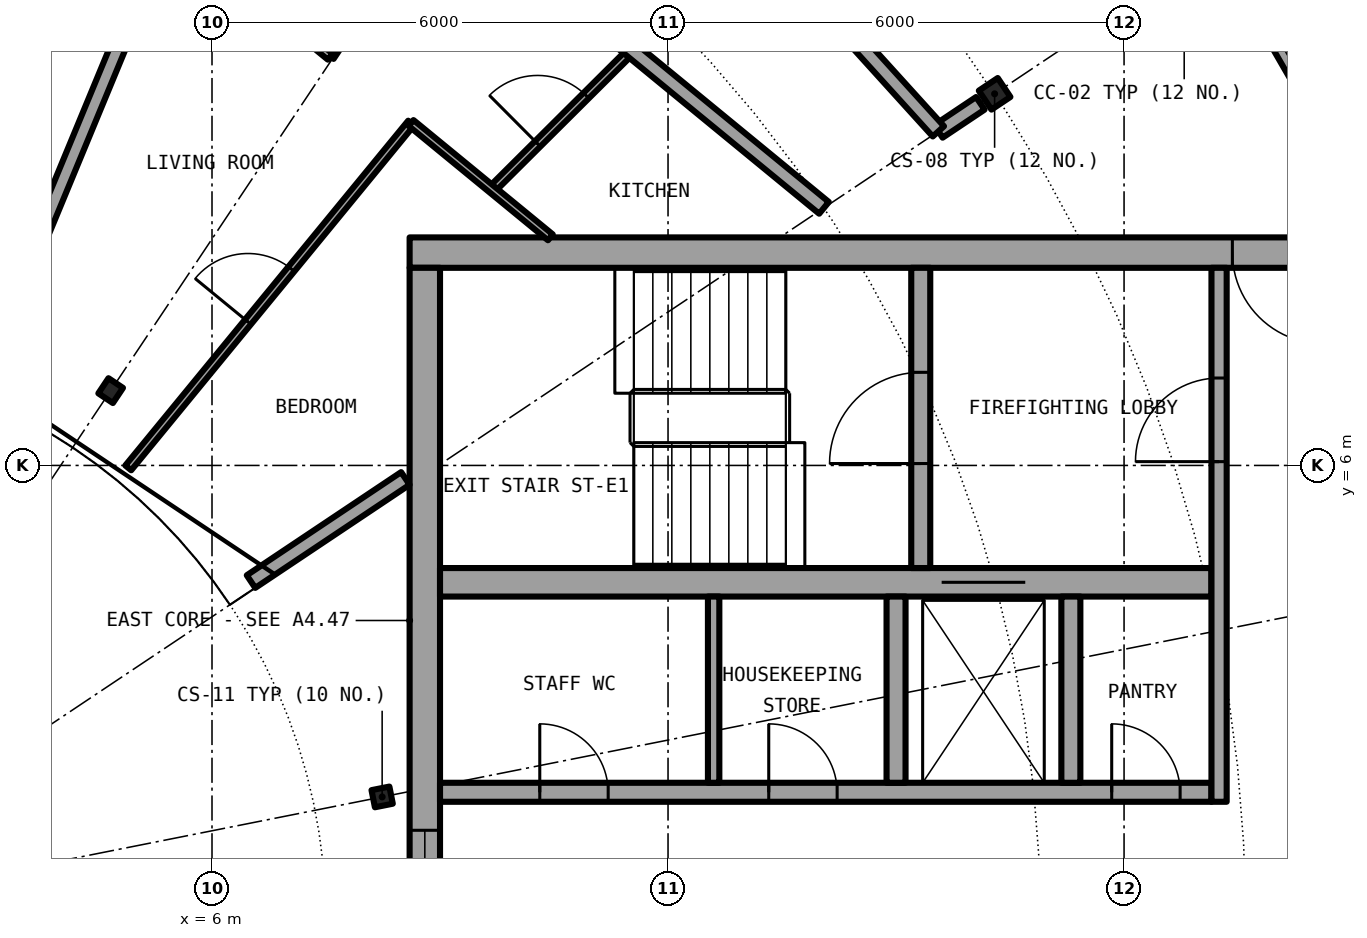
"""IFC4 building model, lengths in metres.
Left out: names, types, materials, properties, quantities, classifications, styles, units other than length and angle.
Written with IfcOpenShell. Run it as: python <this file> out.ifc"""

import sys

from ifc_helpers import new_model, si_unit, direction, frame, frame_2d, origin, origin_2d, place, context, subcontext, project, spatial, rectangle, i_section, extrude, element, fill, save


model = new_model("IFC4")
c1 = context("Model", 3, precision=1e-05, world=origin(), true_north=direction((0.0, 1.0)))
c2 = subcontext(c1, "Body", "Model", "MODEL_VIEW")
j1 = project(units=[si_unit("LENGTHUNIT", "METRE"), si_unit("PLANEANGLEUNIT", "RADIAN")], contexts=[c1])
p1 = place(None, origin())
s1 = spatial("IfcSite", under=j1, at=p1, CompositionType="ELEMENT")
p2 = place(p1, origin())
s2 = spatial("IfcBuilding", under=s1, at=p2, CompositionType="ELEMENT")
p3 = place(p2, frame((0.0, 0.0, 249.3)))
s3 = spatial("IfcBuildingStorey", under=s2, at=p3, CompositionType="ELEMENT", Elevation=249.3)
p4 = place(p3, frame((16.297, 10.889, 0.0), z_axis=(0.0, 0.0, 1.0), x_axis=(0.831469612303, 0.55557023302, 0.0)))
e1 = element("IfcColumn", 1, at=p4, inside=s3, PredefinedType="COLUMN", context=c2, shape_type="SweptSolid", body=[
    extrude(i_section(OverallWidth=0.3, OverallDepth=0.3, WebThickness=0.011, FlangeThickness=0.019, FilletRadius=0.027, at=origin_2d()), origin(), (0.0, 0.0, 1.0), 3.05),
])
for number, where, z_axis, x_axis in (
    (2, (8.239, 1.639, 0.0), (0.0, 0.0, 1.0), (0.981, 0.195, 0.0)),
    (3, (4.667, 6.984, 0.0), (0.0, 0.0, 1.0), (0.556, 0.831, 0.0)),
):
    element("IfcColumn", number, at=place(p3, frame(where, z_axis=z_axis, x_axis=x_axis)), inside=s3, PredefinedType="COLUMN", context=c2, shape_type="SweptSolid", body=[
        extrude(i_section(OverallWidth=0.24, OverallDepth=0.23, WebThickness=0.008, FlangeThickness=0.012, FilletRadius=0.021, at=origin_2d()), origin(), (0.0, 0.0, 1.0), 3.05),
    ])
p5 = place(p3, frame((20.807, 10.261, 0.0), z_axis=(0.0, 0.0, 1.0), x_axis=(-0.499903546559, 0.866081084043, 0.0)))
e4 = element("IfcWall", 4, at=p5, inside=s3, PredefinedType="SOLIDWALL", context=c2, shape_type="SweptSolid", body=[
    extrude(rectangle(XDim=3.034, YDim=0.25, at=frame_2d((1.517, 0.0))), origin(), (0.0, 0.0, 1.0), 2.7),
])
p6 = place(p5, frame((0.617, 0.0, 0.3)))
e5 = element("IfcOpeningElement", 5, at=p6, cuts=e4, PredefinedType="OPENING", context=c2, shape_type="SweptSolid", body=[
    extrude(rectangle(XDim=1.8, YDim=2.1, at=frame_2d((0.9, 1.05))), frame((0.0, 0.135, 0.0), z_axis=(0.0, -1.0, 0.0), x_axis=(1.0, 0.0, 0.0)), (0.0, 0.0, 1.0), 0.27),
])
p7 = place(p3, frame((21.1, 8.8, 0.0), z_axis=(0.0, 0.0, 1.0), x_axis=(-1.0, 0.0, 0.0)))
e6 = element("IfcWall", 6, at=p7, inside=s3, PredefinedType="SHEAR", context=c2, shape_type="SweptSolid", body=[
    extrude(rectangle(XDim=12.5, YDim=0.4, at=frame_2d((6.25, 0.0))), origin(), (0.0, 0.0, 1.0), 3.05),
])
p8 = place(p7, frame((0.475, 0.0, 0.0)))
e7 = element("IfcOpeningElement", 7, at=p8, cuts=e6, PredefinedType="OPENING", context=c2, shape_type="SweptSolid", body=[
    extrude(rectangle(XDim=1.2, YDim=2.3, at=frame_2d((0.6, 1.15))), frame((0.0, 0.21, 0.0), z_axis=(0.0, -1.0, 0.0), x_axis=(1.0, 0.0, 0.0)), (0.0, 0.0, 1.0), 0.42),
])
p9 = place(p3, frame((8.8, -8.6, 0.0), z_axis=(0.0, 0.0, 1.0), x_axis=(0.0, 1.0, 0.0)))
e8 = element("IfcWall", 8, at=p9, inside=s3, PredefinedType="SHEAR", context=c2, shape_type="SweptSolid", body=[
    extrude(rectangle(XDim=17.2, YDim=0.4, at=frame_2d((8.6, 0.0))), origin(), (0.0, 0.0, 1.0), 3.05),
])
p10 = place(p9, frame((7.4, 0.0, 0.1)))
e9 = element("IfcOpeningElement", 9, at=p10, cuts=e8, PredefinedType="OPENING", context=c2, shape_type="SweptSolid", body=[
    extrude(rectangle(XDim=2.4, YDim=2.2, at=frame_2d((1.2, 1.1))), frame((0.0, 0.21, 0.0), z_axis=(0.0, -1.0, 0.0), x_axis=(1.0, 0.0, 0.0)), (0.0, 0.0, 1.0), 0.42),
])
p11 = place(p3, frame((9.0, 1.7, 0.0), z_axis=(0.0, 0.0, 1.0), x_axis=(1.0, 0.0, 0.0)))
e10 = element("IfcWall", 10, at=p11, inside=s3, PredefinedType="SHEAR", context=c2, shape_type="SweptSolid", body=[
    extrude(rectangle(XDim=10.15, YDim=0.25, at=frame_2d((5.075, 0.0))), origin(), (0.0, 0.0, 1.0), 3.05),
])
p12 = place(p11, frame((1.312, 0.0, 0.0)))
e11 = element("IfcOpeningElement", 11, at=p12, cuts=e10, PredefinedType="OPENING", context=c2, shape_type="SweptSolid", body=[
    extrude(rectangle(XDim=0.9, YDim=2.3, at=frame_2d((0.45, 1.15))), frame((0.0, 0.135, 0.0), z_axis=(0.0, -1.0, 0.0), x_axis=(1.0, 0.0, 0.0)), (0.0, 0.0, 1.0), 0.27),
])
p13 = place(p11, frame((4.325, 0.0, 0.0)))
e12 = element("IfcOpeningElement", 12, at=p13, cuts=e10, PredefinedType="OPENING", context=c2, shape_type="SweptSolid", body=[
    extrude(rectangle(XDim=0.9, YDim=2.3, at=frame_2d((0.45, 1.15))), frame((0.0, 0.135, 0.0), z_axis=(0.0, -1.0, 0.0), x_axis=(1.0, 0.0, 0.0)), (0.0, 0.0, 1.0), 0.27),
])
p14 = place(p11, frame((8.837, 0.0, 0.0)))
e13 = element("IfcOpeningElement", 13, at=p14, cuts=e10, PredefinedType="OPENING", context=c2, shape_type="SweptSolid", body=[
    extrude(rectangle(XDim=0.9, YDim=2.3, at=frame_2d((0.45, 1.15))), frame((0.0, 0.135, 0.0), z_axis=(0.0, -1.0, 0.0), x_axis=(1.0, 0.0, 0.0)), (0.0, 0.0, 1.0), 0.27),
])
p15 = place(p3, frame((9.0, 4.462, 0.0), z_axis=(0.0, 0.0, 1.0), x_axis=(1.0, 0.0, 0.0)))
e14 = element("IfcWall", 14, at=p15, inside=s3, PredefinedType="SHEAR", context=c2, shape_type="SweptSolid", body=[
    extrude(rectangle(XDim=10.15, YDim=0.375, at=frame_2d((5.075, 0.0))), origin(), (0.0, 0.0, 1.0), 3.05),
])
p16 = place(p15, frame((6.6, 0.0, 0.0)))
e15 = element("IfcOpeningElement", 15, at=p16, cuts=e14, PredefinedType="OPENING", context=c2, shape_type="SweptSolid", body=[
    extrude(rectangle(XDim=1.1, YDim=2.3, at=frame_2d((0.55, 1.15))), frame((0.0, 0.198, 0.0), z_axis=(0.0, -1.0, 0.0), x_axis=(1.0, 0.0, 0.0)), (0.0, 0.0, 1.0), 0.395),
])
p17 = place(p3, frame((15.325, 4.65, 0.0), z_axis=(0.0, 0.0, 1.0), x_axis=(0.0, 1.0, 0.0)))
e16 = element("IfcWall", 16, at=p17, inside=s3, PredefinedType="SHEAR", context=c2, shape_type="SweptSolid", body=[
    extrude(rectangle(XDim=3.95, YDim=0.25, at=frame_2d((1.975, 0.0))), origin(), (0.0, 0.0, 1.0), 3.05),
])
p18 = place(p17, frame((1.375, 0.0, 0.0)))
e17 = element("IfcOpeningElement", 17, at=p18, cuts=e16, PredefinedType="OPENING", context=c2, shape_type="SweptSolid", body=[
    extrude(rectangle(XDim=1.2, YDim=2.3, at=frame_2d((0.6, 1.15))), frame((0.0, 0.135, 0.0), z_axis=(0.0, -1.0, 0.0), x_axis=(1.0, 0.0, 0.0)), (0.0, 0.0, 1.0), 0.27),
])
for number, where, z_axis, x_axis in (
    (18, (15.0, 1.825, 0.0), (0.0, 0.0, 1.0), (0.0, 1.0, 0.0)),
    (19, (17.3, 1.825, 0.0), (0.0, 0.0, 1.0), (0.0, 1.0, 0.0)),
):
    element("IfcWall", number, at=place(p3, frame(where, z_axis=z_axis, x_axis=x_axis)), inside=s3, PredefinedType="SOLIDWALL", context=c2, shape_type="SweptSolid", body=[
        extrude(rectangle(XDim=2.45, YDim=0.25, at=frame_2d((1.225, 0.0))), origin(), (0.0, 0.0, 1.0), 2.7),
    ])
p19 = place(p3, frame((19.25, 1.575, 0.0), z_axis=(0.0, 0.0, 1.0), x_axis=(0.0, 1.0, 0.0)))
e20 = element("IfcWall", 20, at=p19, inside=s3, PredefinedType="SOLIDWALL", context=c2, shape_type="SweptSolid", body=[
    extrude(rectangle(XDim=7.025, YDim=0.2, at=frame_2d((3.513, 0.0))), origin(), (0.0, 0.0, 1.0), 2.7),
])
p20 = place(p19, frame((4.475, 0.0, 0.0)))
e21 = element("IfcOpeningElement", 21, at=p20, cuts=e20, PredefinedType="OPENING", context=c2, shape_type="SweptSolid", body=[
    extrude(rectangle(XDim=1.1, YDim=2.3, at=frame_2d((0.55, 1.15))), frame((0.0, 0.11, 0.0), z_axis=(0.0, -1.0, 0.0), x_axis=(1.0, 0.0, 0.0)), (0.0, 0.0, 1.0), 0.22),
])
p21 = place(p3, frame((12.6, 1.825, 0.0), z_axis=(0.0, 0.0, 1.0), x_axis=(0.0, 1.0, 0.0)))
e22 = element("IfcWall", 22, at=p21, inside=s3, PredefinedType="PARTITIONING", context=c2, shape_type="SweptSolid", body=[
    extrude(rectangle(XDim=2.45, YDim=0.15, at=frame_2d((1.225, 0.0))), origin(), (0.0, 0.0, 1.0), 2.7),
])
p22 = place(p3, frame((2.955, 7.132, 0.0), z_axis=(0.0, 0.0, 1.0), x_axis=(0.382556139466, 0.923932248683, 0.0)))
e23 = element("IfcWall", 23, at=p22, inside=s3, PredefinedType="PARTITIONING", context=c2, shape_type="SweptSolid", body=[
    extrude(rectangle(XDim=9.18, YDim=0.2, at=frame_2d((4.59, 0.0))), origin(), (0.0, 0.0, 1.0), 2.7),
])
p23 = place(p3, frame((4.898, 5.968, 0.0), z_axis=(0.0, 0.0, 1.0), x_axis=(0.634358693064, 0.773038840249, 0.0)))
e24 = element("IfcWall", 24, at=p23, inside=s3, PredefinedType="PARTITIONING", context=c2, shape_type="SweptSolid", body=[
    extrude(rectangle(XDim=5.868, YDim=0.1, at=frame_2d((2.934, 0.0))), origin(), (0.0, 0.0, 1.0), 2.7),
])
p24 = place(p23, frame((2.484, 0.0, 0.0)))
e25 = element("IfcOpeningElement", 25, at=p24, cuts=e24, PredefinedType="OPENING", context=c2, shape_type="SweptSolid", body=[
    extrude(rectangle(XDim=0.9, YDim=2.3, at=frame_2d((0.45, 1.15))), frame((0.0, 0.06, 0.0), z_axis=(0.0, -1.0, 0.0), x_axis=(1.0, 0.0, 0.0)), (0.0, 0.0, 1.0), 0.12),
])
p25 = place(p3, frame((7.558, 11.376, 0.0), z_axis=(0.0, 0.0, 1.0), x_axis=(0.553615197403, 0.83277260594, 0.0)))
e26 = element("IfcWall", 26, at=p25, inside=s3, PredefinedType="PARTITIONING", context=c2, shape_type="SweptSolid", body=[
    extrude(rectangle(XDim=2.597, YDim=0.1, at=frame_2d((1.299, 0.0))), origin(), (0.0, 0.0, 1.0), 2.7),
])
p26 = place(p3, frame((9.683, 9.632, 0.0), z_axis=(0.0, 0.0, 1.0), x_axis=(0.708796844581, 0.705412668665, 0.0)))
e27 = element("IfcWall", 27, at=p26, inside=s3, PredefinedType="PARTITIONING", context=c2, shape_type="SweptSolid", body=[
    extrude(rectangle(XDim=2.597, YDim=0.1, at=frame_2d((1.299, 0.0))), origin(), (0.0, 0.0, 1.0), 2.7),
])
p27 = place(p26, frame((0.849, 0.0, 0.0)))
e28 = element("IfcOpeningElement", 28, at=p27, cuts=e27, PredefinedType="OPENING", context=c2, shape_type="SweptSolid", body=[
    extrude(rectangle(XDim=0.9, YDim=2.3, at=frame_2d((0.45, 1.15))), frame((0.0, 0.06, 0.0), z_axis=(0.0, -1.0, 0.0), x_axis=(1.0, 0.0, 0.0)), (0.0, 0.0, 1.0), 0.12),
])
p28 = place(p3, frame((15.557, 10.395, 0.0), z_axis=(0.0, 0.0, 1.0), x_axis=(0.831427465951, 0.555633304313, 0.0)))
e29 = element("IfcWall", 29, at=p28, inside=s3, PredefinedType="PARTITIONING", context=c2, shape_type="SweptSolid", body=[
    extrude(rectangle(XDim=0.664, YDim=0.2, at=frame_2d((0.332, 0.0))), origin(), (0.0, 0.0, 1.0), 2.7),
])
p29 = place(p3, frame((6.513, 4.472, 0.0), z_axis=(0.0, 0.0, 1.0), x_axis=(0.831450132577, 0.555599385382, 0.0)))
e30 = element("IfcWall", 30, at=p29, inside=s3, PredefinedType="PARTITIONING", context=c2, shape_type="SweptSolid", body=[
    extrude(rectangle(XDim=2.443, YDim=0.2, at=frame_2d((1.221, 0.0))), origin(), (0.0, 0.0, 1.0), 2.7),
])
p30 = place(p3, frame((5.431, 13.12, 0.0), z_axis=(0.0, 0.0, 1.0), x_axis=(0.773149312811, -0.634224045665, 0.0)))
e31 = element("IfcWall", 31, at=p30, inside=s3, PredefinedType="PARTITIONING", context=c2, shape_type="SweptSolid", body=[
    extrude(rectangle(XDim=2.749, YDim=0.1, at=frame_2d((1.374, 0.0))), origin(), (0.0, 0.0, 1.0), 2.7),
])
p31 = place(p30, frame((0.927, 0.0, 0.0)))
e32 = element("IfcOpeningElement", 32, at=p31, cuts=e31, PredefinedType="OPENING", context=c2, shape_type="SweptSolid", body=[
    extrude(rectangle(XDim=0.9, YDim=2.3, at=frame_2d((0.45, 1.15))), frame((0.0, 0.06, 0.0), z_axis=(0.0, -1.0, 0.0), x_axis=(1.0, 0.0, 0.0)), (0.0, 0.0, 1.0), 0.12),
])
p32 = place(p3, frame((8.619, 10.505, 0.0), z_axis=(0.0, 0.0, 1.0), x_axis=(0.773094085324, -0.634291364624, 0.0)))
e33 = element("IfcWall", 33, at=p32, inside=s3, PredefinedType="PARTITIONING", context=c2, shape_type="SweptSolid", body=[
    extrude(rectangle(XDim=2.371, YDim=0.1, at=frame_2d((1.186, 0.0))), origin(), (0.0, 0.0, 1.0), 2.7),
])
p33 = place(p3, frame((6.47, 15.613, 0.0), z_axis=(0.0, 0.0, 1.0), x_axis=(0.77292501819, -0.634497372931, 0.0)))
e34 = element("IfcWall", 34, at=p33, inside=s3, PredefinedType="PARTITIONING", context=c2, shape_type="SweptSolid", body=[
    extrude(rectangle(XDim=9.81, YDim=0.2, at=frame_2d((4.905, 0.0))), origin(), (0.0, 0.0, 1.0), 2.7),
])
p34 = place(p33, frame((4.404, 0.0, 0.0)))
e35 = element("IfcOpeningElement", 35, at=p34, cuts=e34, PredefinedType="OPENING", context=c2, shape_type="SweptSolid", body=[
    extrude(rectangle(XDim=1.0, YDim=2.3, at=frame_2d((0.5, 1.15))), frame((0.0, 0.11, 0.0), z_axis=(0.0, -1.0, 0.0), x_axis=(1.0, 0.0, 0.0)), (0.0, 0.0, 1.0), 0.22),
])
p35 = place(p3, frame((11.87, 14.464, 0.0), z_axis=(0.0, 0.0, 1.0), x_axis=(0.671434738137, -0.741063689856, 0.0)))
e36 = element("IfcWall", 36, at=p35, inside=s3, PredefinedType="PARTITIONING", context=c2, shape_type="SweptSolid", body=[
    extrude(rectangle(XDim=5.491, YDim=0.2, at=frame_2d((2.746, 0.0))), origin(), (0.0, 0.0, 1.0), 2.7),
])
p36 = place(p35, frame((2.245, 0.0, 0.0)))
e37 = element("IfcOpeningElement", 37, at=p36, cuts=e36, PredefinedType="OPENING", context=c2, shape_type="SweptSolid", body=[
    extrude(rectangle(XDim=1.0, YDim=2.3, at=frame_2d((0.5, 1.15))), frame((0.0, 0.11, 0.0), z_axis=(0.0, -1.0, 0.0), x_axis=(1.0, 0.0, 0.0)), (0.0, 0.0, 1.0), 0.22),
])
p37 = place(p6, origin())
e38 = element("IfcWindow", 38, at=p37, inside=s3, PartitioningType="SINGLE_PANEL", PredefinedType="WINDOW", context=c2, shape_type="SweptSolid", body=[
    extrude(rectangle(XDim=1.8, YDim=2.1, at=frame_2d((0.9, 1.05))), frame((0.0, 0.03, 0.0), z_axis=(0.0, -1.0, 0.0), x_axis=(1.0, 0.0, 0.0)), (0.0, 0.0, 1.0), 0.06),
])
fill(e5, e38)
p38 = place(p16, origin())
e39 = element("IfcDoor", 39, at=p38, inside=s3, OperationType="DOUBLE_DOOR_SLIDING", PredefinedType="DOOR", context=c2, shape_type="SweptSolid", body=[
    extrude(rectangle(XDim=1.1, YDim=2.3, at=frame_2d((0.55, 1.15))), frame((0.0, 0.025, 0.0), z_axis=(0.0, -1.0, 0.0), x_axis=(1.0, 0.0, 0.0)), (0.0, 0.0, 1.0), 0.05),
])
fill(e15, e39)
p39 = place(p12, origin())
e40 = element("IfcDoor", 40, at=p39, inside=s3, OperationType="SINGLE_SWING_RIGHT", PredefinedType="DOOR", context=c2, shape_type="SweptSolid", body=[
    extrude(rectangle(XDim=0.9, YDim=2.3, at=frame_2d((0.45, 1.15))), frame((0.0, 0.025, 0.0), z_axis=(0.0, -1.0, 0.0), x_axis=(1.0, 0.0, 0.0)), (0.0, 0.0, 1.0), 0.05),
])
fill(e11, e40)
p40 = place(p13, origin())
e41 = element("IfcDoor", 41, at=p40, inside=s3, OperationType="SINGLE_SWING_RIGHT", PredefinedType="DOOR", context=c2, shape_type="SweptSolid", body=[
    extrude(rectangle(XDim=0.9, YDim=2.3, at=frame_2d((0.45, 1.15))), frame((0.0, 0.025, 0.0), z_axis=(0.0, -1.0, 0.0), x_axis=(1.0, 0.0, 0.0)), (0.0, 0.0, 1.0), 0.05),
])
fill(e12, e41)
p41 = place(p14, origin())
e42 = element("IfcDoor", 42, at=p41, inside=s3, OperationType="SINGLE_SWING_LEFT", PredefinedType="DOOR", context=c2, shape_type="SweptSolid", body=[
    extrude(rectangle(XDim=0.9, YDim=2.3, at=frame_2d((0.45, 1.15))), frame((0.0, 0.025, 0.0), z_axis=(0.0, -1.0, 0.0), x_axis=(1.0, 0.0, 0.0)), (0.0, 0.0, 1.0), 0.05),
])
fill(e13, e42)
p42 = place(p18, origin())
e43 = element("IfcDoor", 43, at=p42, inside=s3, OperationType="SINGLE_SWING_LEFT", PredefinedType="DOOR", context=c2, shape_type="SweptSolid", body=[
    extrude(rectangle(XDim=1.2, YDim=2.3, at=frame_2d((0.6, 1.15))), frame((0.0, 0.025, 0.0), z_axis=(0.0, -1.0, 0.0), x_axis=(1.0, 0.0, 0.0)), (0.0, 0.0, 1.0), 0.05),
])
fill(e17, e43)
p43 = place(p20, origin())
e44 = element("IfcDoor", 44, at=p43, inside=s3, OperationType="SINGLE_SWING_LEFT", PredefinedType="DOOR", context=c2, shape_type="SweptSolid", body=[
    extrude(rectangle(XDim=1.1, YDim=2.3, at=frame_2d((0.55, 1.15))), frame((0.0, 0.025, 0.0), z_axis=(0.0, -1.0, 0.0), x_axis=(1.0, 0.0, 0.0)), (0.0, 0.0, 1.0), 0.05),
])
fill(e21, e44)
p44 = place(p8, origin())
e45 = element("IfcDoor", 45, at=p44, inside=s3, OperationType="SINGLE_SWING_RIGHT", PredefinedType="DOOR", context=c2, shape_type="SweptSolid", body=[
    extrude(rectangle(XDim=1.2, YDim=2.3, at=frame_2d((0.6, 1.15))), frame((0.0, 0.025, 0.0), z_axis=(0.0, -1.0, 0.0), x_axis=(1.0, 0.0, 0.0)), (0.0, 0.0, 1.0), 0.05),
])
fill(e7, e45)
p45 = place(p10, origin())
e46 = element("IfcWindow", 46, at=p45, inside=s3, PartitioningType="SINGLE_PANEL", PredefinedType="WINDOW", context=c2, shape_type="SweptSolid", body=[
    extrude(rectangle(XDim=2.4, YDim=2.2, at=frame_2d((1.2, 1.1))), frame((0.0, 0.03, 0.0), z_axis=(0.0, -1.0, 0.0), x_axis=(1.0, 0.0, 0.0)), (0.0, 0.0, 1.0), 0.06),
])
fill(e9, e46)
p46 = place(p27, origin())
e47 = element("IfcDoor", 47, at=p46, inside=s3, OperationType="SINGLE_SWING_LEFT", PredefinedType="DOOR", context=c2, shape_type="SweptSolid", body=[
    extrude(rectangle(XDim=0.9, YDim=2.3, at=frame_2d((0.45, 1.15))), frame((0.0, 0.025, 0.0), z_axis=(0.0, -1.0, 0.0), x_axis=(1.0, 0.0, 0.0)), (0.0, 0.0, 1.0), 0.05),
])
fill(e28, e47)
p47 = place(p24, origin())
e48 = element("IfcDoor", 48, at=p47, inside=s3, OperationType="SINGLE_SWING_RIGHT", PredefinedType="DOOR", context=c2, shape_type="SweptSolid", body=[
    extrude(rectangle(XDim=0.9, YDim=2.3, at=frame_2d((0.45, 1.15))), frame((0.0, 0.025, 0.0), z_axis=(0.0, -1.0, 0.0), x_axis=(1.0, 0.0, 0.0)), (0.0, 0.0, 1.0), 0.05),
])
fill(e25, e48)
save(model, sys.argv[1])
